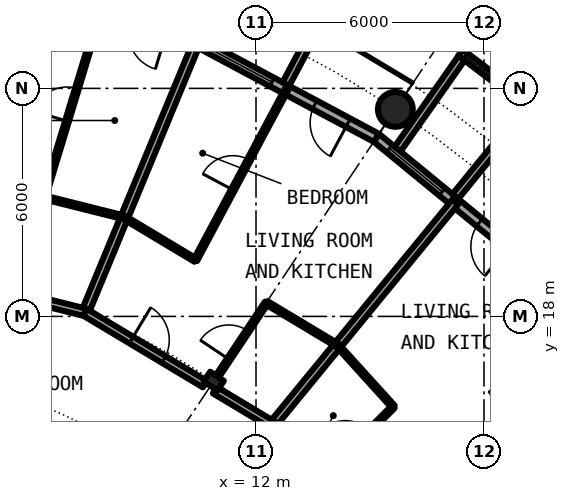
"""IFC4 building model, lengths in metres.
Left out: names, types, materials, properties, quantities, classifications, styles, units other than length and angle.
Written with IfcOpenShell. Run it as: python <this file> out.ifc"""

import sys

from ifc_helpers import new_model, si_unit, direction, frame, frame_2d, origin, origin_2d, place, context, subcontext, project, spatial, rectangle, circle, hollow_circle, i_section, extrude, element, fill, save


model = new_model("IFC4")
c1 = context("Model", 3, precision=1e-05, world=origin(), true_north=direction((0.0, 1.0)))
c2 = subcontext(c1, "Body", "Model", "MODEL_VIEW")
j1 = project(units=[si_unit("LENGTHUNIT", "METRE"), si_unit("PLANEANGLEUNIT", "RADIAN")], contexts=[c1])
p1 = place(None, origin())
s1 = spatial("IfcSite", under=j1, at=p1, CompositionType="ELEMENT")
p2 = place(p1, origin())
s2 = spatial("IfcBuilding", under=s1, at=p2, CompositionType="ELEMENT")
p3 = place(p2, frame((0.0, 0.0, 123.85)))
s3 = spatial("IfcBuildingStorey", under=s2, at=p3, CompositionType="ELEMENT", Elevation=123.85)
p4 = place(p3, frame((15.667, 23.448, 0.0), z_axis=(0.0, 0.0, 1.0), x_axis=(1.0, 0.0, 0.0)))
e1 = element("IfcColumn", 1, at=p4, inside=s3, PredefinedType="COLUMN", context=c2, shape_type="SweptSolid", body=[
    extrude(hollow_circle(Radius=0.457, WallThickness=0.04, at=origin_2d()), origin(), (0.0, 0.0, 1.0), 3.05),
])
p5 = place(p3, frame((10.889, 16.297, 0.0), z_axis=(0.0, 0.0, 1.0), x_axis=(0.55557023302, 0.831469612303, 0.0)))
e2 = element("IfcColumn", 2, at=p5, inside=s3, PredefinedType="COLUMN", context=c2, shape_type="SweptSolid", body=[
    extrude(i_section(OverallWidth=0.307, OverallDepth=0.432, WebThickness=0.021, FlangeThickness=0.04, FilletRadius=0.027, at=origin_2d()), origin(), (0.0, 0.0, 1.0), 3.05),
])
p6 = place(p3, frame((19.304, 19.304, 0.0), z_axis=(0.0, 0.0, 1.0), x_axis=(-0.773019449054, 0.634382322723, 0.0)))
e3 = element("IfcWall", 3, at=p6, inside=s3, PredefinedType="SOLIDWALL", context=c2, shape_type="SweptSolid", body=[
    extrude(rectangle(XDim=5.352, YDim=0.25, at=frame_2d((2.676, 0.0))), origin(), (0.0, 0.0, 1.0), 2.7),
])
p7 = place(p6, frame((0.841, 0.0, 0.0)))
e4 = element("IfcOpeningElement", 4, at=p7, cuts=e3, PredefinedType="OPENING", context=c2, shape_type="SweptSolid", body=[
    extrude(rectangle(XDim=1.0, YDim=2.2, at=frame_2d((0.5, 1.1))), frame((0.0, 0.135, 0.0), z_axis=(0.0, -1.0, 0.0), x_axis=(1.0, 0.0, 0.0)), (0.0, 0.0, 1.0), 0.27),
])
p8 = place(p6, frame((3.111, 0.0, 0.3)))
e5 = element("IfcOpeningElement", 5, at=p8, cuts=e3, PredefinedType="OPENING", context=c2, shape_type="SweptSolid", body=[
    extrude(rectangle(XDim=1.8, YDim=2.1, at=frame_2d((0.9, 1.05))), frame((0.0, 0.135, 0.0), z_axis=(0.0, -1.0, 0.0), x_axis=(1.0, 0.0, 0.0)), (0.0, 0.0, 1.0), 0.27),
])
p9 = place(p3, frame((19.289, 23.497, -0.03), z_axis=(0.0, 0.0, 1.0), x_axis=(-0.797456837111, 0.603375996329, 0.0)))
e6 = element("IfcWall", 6, at=p9, inside=s3, PredefinedType="SOLIDWALL", context=c2, shape_type="SweptSolid", body=[
    extrude(rectangle(XDim=2.391, YDim=0.2, at=frame_2d((1.196, 0.0))), origin(), (0.0, 0.0, 1.0), 2.73),
])
p10 = place(p9, frame((0.156, 0.0, 0.33)))
e7 = element("IfcOpeningElement", 7, at=p10, cuts=e6, PredefinedType="OPENING", context=c2, shape_type="SweptSolid", body=[
    extrude(circle(Radius=1.04, at=frame_2d((1.04, 1.04))), frame((0.0, 0.11, 0.0), z_axis=(0.0, -1.0, 0.0), x_axis=(1.0, 0.0, 0.0)), (0.0, 0.0, 1.0), 0.22),
])
p11 = place(p3, frame((17.246, 21.155, -0.03), z_axis=(0.0, 0.0, 1.0), x_axis=(0.631741648902, 0.775179004516, 0.0)))
e8 = element("IfcWall", 8, at=p11, inside=s3, PredefinedType="SOLIDWALL", context=c2, shape_type="SweptSolid", body=[
    extrude(rectangle(XDim=3.006, YDim=0.2, at=frame_2d((1.503, 0.0))), origin(), (0.0, 0.0, 1.0), 2.73),
])
p12 = place(p3, frame((15.726, 22.402, -0.03), z_axis=(0.0, 0.0, 1.0), x_axis=(0.574826383135, 0.818275399393, 0.0)))
e9 = element("IfcWall", 9, at=p12, inside=s3, PredefinedType="SOLIDWALL", context=c2, shape_type="SweptSolid", body=[
    extrude(rectangle(XDim=2.929, YDim=0.2, at=frame_2d((1.465, 0.0))), origin(), (0.0, 0.0, 1.0), 2.73),
])
p13 = place(p3, frame((15.167, 22.699, 0.0), z_axis=(0.0, 0.0, 1.0), x_axis=(-0.881915646801, 0.471407246368, 0.0)))
e10 = element("IfcWall", 10, at=p13, inside=s3, PredefinedType="SOLIDWALL", context=c2, shape_type="SweptSolid", body=[
    extrude(rectangle(XDim=5.352, YDim=0.25, at=frame_2d((2.676, 0.0))), origin(), (0.0, 0.0, 1.0), 2.7),
])
p14 = place(p13, frame((0.841, 0.0, 0.0)))
e11 = element("IfcOpeningElement", 11, at=p14, cuts=e10, PredefinedType="OPENING", context=c2, shape_type="SweptSolid", body=[
    extrude(rectangle(XDim=1.0, YDim=2.2, at=frame_2d((0.5, 1.1))), frame((0.0, 0.135, 0.0), z_axis=(0.0, -1.0, 0.0), x_axis=(1.0, 0.0, 0.0)), (0.0, 0.0, 1.0), 0.27),
])
p15 = place(p13, frame((3.111, 0.0, 0.3)))
e12 = element("IfcOpeningElement", 12, at=p15, cuts=e10, PredefinedType="OPENING", context=c2, shape_type="SweptSolid", body=[
    extrude(rectangle(XDim=1.8, YDim=2.1, at=frame_2d((0.9, 1.05))), frame((0.0, 0.135, 0.0), z_axis=(0.0, -1.0, 0.0), x_axis=(1.0, 0.0, 0.0)), (0.0, 0.0, 1.0), 0.27),
])
p16 = place(p3, frame((12.787, 24.113, -0.03), z_axis=(0.0, 0.0, 1.0), x_axis=(0.468365282436, 0.883534924159, 0.0)))
e13 = element("IfcWall", 13, at=p16, inside=s3, PredefinedType="SOLIDWALL", context=c2, shape_type="SweptSolid", body=[
    extrude(rectangle(XDim=3.006, YDim=0.2, at=frame_2d((1.503, 0.0))), origin(), (0.0, 0.0, 1.0), 2.73),
])
p17 = place(p3, frame((6.418, 21.133, 0.0), z_axis=(0.0, 0.0, 1.0), x_axis=(0.290651827018, 0.956828885147, 0.0)))
e14 = element("IfcWall", 14, at=p17, inside=s3, PredefinedType="PARTITIONING", context=c2, shape_type="SweptSolid", body=[
    extrude(rectangle(XDim=5.089, YDim=0.1, at=frame_2d((2.544, 0.0))), origin(), (0.0, 0.0, 1.0), 2.7),
])
p18 = place(p17, frame((2.094, 0.0, 0.0)))
e15 = element("IfcOpeningElement", 15, at=p18, cuts=e14, PredefinedType="OPENING", context=c2, shape_type="SweptSolid", body=[
    extrude(rectangle(XDim=0.9, YDim=2.3, at=frame_2d((0.45, 1.15))), frame((0.0, 0.06, 0.0), z_axis=(0.0, -1.0, 0.0), x_axis=(1.0, 0.0, 0.0)), (0.0, 0.0, 1.0), 0.12),
])
p19 = place(p3, frame((7.501, 18.108, 0.0), z_axis=(0.0, 0.0, 1.0), x_axis=(0.382490346157, 0.923959487801, 0.0)))
e16 = element("IfcWall", 16, at=p19, inside=s3, PredefinedType="PARTITIONING", context=c2, shape_type="SweptSolid", body=[
    extrude(rectangle(XDim=7.574, YDim=0.2, at=frame_2d((3.787, 0.0))), origin(), (0.0, 0.0, 1.0), 2.7),
])
p20 = place(p3, frame((10.405, 19.481, 0.0), z_axis=(0.0, 0.0, 1.0), x_axis=(0.471170755767, 0.882042016522, 0.0)))
e17 = element("IfcWall", 17, at=p20, inside=s3, PredefinedType="PARTITIONING", context=c2, shape_type="SweptSolid", body=[
    extrude(rectangle(XDim=5.089, YDim=0.1, at=frame_2d((2.545, 0.0))), origin(), (0.0, 0.0, 1.0), 2.7),
])
p21 = place(p20, frame((2.095, 0.0, 0.0)))
e18 = element("IfcOpeningElement", 18, at=p21, cuts=e17, PredefinedType="OPENING", context=c2, shape_type="SweptSolid", body=[
    extrude(rectangle(XDim=0.9, YDim=2.3, at=frame_2d((0.45, 1.15))), frame((0.0, 0.06, 0.0), z_axis=(0.0, -1.0, 0.0), x_axis=(1.0, 0.0, 0.0)), (0.0, 0.0, 1.0), 0.12),
])
p22 = place(p3, frame((11.015, 16.473, 0.0), z_axis=(0.0, 0.0, 1.0), x_axis=(0.555568680968, 0.831470649348, 0.0)))
e19 = element("IfcWall", 19, at=p22, inside=s3, PredefinedType="PARTITIONING", context=c2, shape_type="SweptSolid", body=[
    extrude(rectangle(XDim=2.27, YDim=0.1, at=frame_2d((1.135, 0.0))), origin(), (0.0, 0.0, 1.0), 2.7),
])
p23 = place(p22, frame((0.483, 0.0, 0.0)))
e20 = element("IfcOpeningElement", 20, at=p23, cuts=e19, PredefinedType="OPENING", context=c2, shape_type="SweptSolid", body=[
    extrude(rectangle(XDim=0.9, YDim=2.3, at=frame_2d((0.45, 1.15))), frame((0.0, 0.06, 0.0), z_axis=(0.0, -1.0, 0.0), x_axis=(1.0, 0.0, 0.0)), (0.0, 0.0, 1.0), 0.12),
])
p24 = place(p3, frame((12.434, 15.151, 0.0), z_axis=(0.0, 0.0, 1.0), x_axis=(0.634381303318, 0.773020285633, 0.0)))
e21 = element("IfcWall", 21, at=p24, inside=s3, PredefinedType="PARTITIONING", context=c2, shape_type="SweptSolid", body=[
    extrude(rectangle(XDim=7.576, YDim=0.2, at=frame_2d((3.788, 0.0))), origin(), (0.0, 0.0, 1.0), 2.7),
])
p25 = place(p3, frame((13.722, 13.73, 0.0), z_axis=(0.0, 0.0, 1.0), x_axis=(0.706741540154, 0.707471833659, 0.0)))
e22 = element("IfcWall", 22, at=p25, inside=s3, PredefinedType="PARTITIONING", context=c2, shape_type="SweptSolid", body=[
    extrude(rectangle(XDim=2.674, YDim=0.1, at=frame_2d((1.337, 0.0))), origin(), (0.0, 0.0, 1.0), 2.7),
])
p26 = place(p25, frame((0.887, 0.0, 0.0)))
e23 = element("IfcOpeningElement", 23, at=p26, cuts=e22, PredefinedType="OPENING", context=c2, shape_type="SweptSolid", body=[
    extrude(rectangle(XDim=0.9, YDim=2.3, at=frame_2d((0.45, 1.15))), frame((0.0, 0.06, 0.0), z_axis=(0.0, -1.0, 0.0), x_axis=(1.0, 0.0, 0.0)), (0.0, 0.0, 1.0), 0.12),
])
p27 = place(p3, frame((17.077, 14.006, 0.0), z_axis=(0.0, 0.0, 1.0), x_axis=(0.77326214499, 0.634086472908, 0.0)))
e24 = element("IfcWall", 24, at=p27, inside=s3, PredefinedType="PARTITIONING", context=c2, shape_type="SweptSolid", body=[
    extrude(rectangle(XDim=5.089, YDim=0.1, at=frame_2d((2.544, 0.0))), origin(), (0.0, 0.0, 1.0), 2.7),
])
p28 = place(p27, frame((2.094, 0.0, 0.0)))
e25 = element("IfcOpeningElement", 25, at=p28, cuts=e24, PredefinedType="OPENING", context=c2, shape_type="SweptSolid", body=[
    extrude(rectangle(XDim=0.9, YDim=2.3, at=frame_2d((0.45, 1.15))), frame((0.0, 0.06, 0.0), z_axis=(0.0, -1.0, 0.0), x_axis=(1.0, 0.0, 0.0)), (0.0, 0.0, 1.0), 0.12),
])
p29 = place(p3, frame((3.3, 16.574, 0.0), z_axis=(0.0, 0.0, 1.0), x_axis=(0.831455567902, -0.555591251376, 0.0)))
e26 = element("IfcWall", 26, at=p29, inside=s3, PredefinedType="PARTITIONING", context=c2, shape_type="SweptSolid", body=[
    extrude(rectangle(XDim=11.314, YDim=0.2, at=frame_2d((5.657, 0.0))), origin(), (0.0, 0.0, 1.0), 2.7),
])
p30 = place(p29, frame((4.346, 0.0, 0.0)))
e27 = element("IfcOpeningElement", 27, at=p30, cuts=e26, PredefinedType="OPENING", context=c2, shape_type="SweptSolid", body=[
    extrude(rectangle(XDim=1.0, YDim=2.3, at=frame_2d((0.5, 1.15))), frame((0.0, 0.11, 0.0), z_axis=(0.0, -1.0, 0.0), x_axis=(1.0, 0.0, 0.0)), (0.0, 0.0, 1.0), 0.22),
])
p31 = place(p3, frame((3.936, 19.001, 0.0), z_axis=(0.0, 0.0, 1.0), x_axis=(0.970025155677, -0.243004521262, 0.0)))
e28 = element("IfcWall", 28, at=p31, inside=s3, PredefinedType="PARTITIONING", context=c2, shape_type="SweptSolid", body=[
    extrude(rectangle(XDim=3.675, YDim=0.2, at=frame_2d((1.837, 0.0))), origin(), (0.0, 0.0, 1.0), 2.39),
])
p32 = place(p31, frame((1.258, 0.0, 0.0)))
e29 = element("IfcOpeningElement", 29, at=p32, cuts=e28, PredefinedType="OPENING", context=c2, shape_type="SweptSolid", body=[
    extrude(rectangle(XDim=1.0, YDim=2.3, at=frame_2d((0.5, 1.15))), frame((0.0, 0.11, 0.0), z_axis=(0.0, -1.0, 0.0), x_axis=(1.0, 0.0, 0.0)), (0.0, 0.0, 1.0), 0.22),
])
p33 = place(p3, frame((7.501, 18.108, 0.0), z_axis=(0.0, 0.0, 1.0), x_axis=(0.857774179698, -0.514026708103, 0.0)))
e30 = element("IfcWall", 30, at=p33, inside=s3, PredefinedType="PARTITIONING", context=c2, shape_type="SweptSolid", body=[
    extrude(rectangle(XDim=3.675, YDim=0.2, at=frame_2d((1.837, 0.0))), origin(), (0.0, 0.0, 1.0), 2.39),
])
p34 = place(p33, frame((1.418, 0.0, 0.0)))
e31 = element("IfcOpeningElement", 31, at=p34, cuts=e30, PredefinedType="OPENING", context=c2, shape_type="SweptSolid", body=[
    extrude(rectangle(XDim=1.0, YDim=2.3, at=frame_2d((0.5, 1.15))), frame((0.0, 0.11, 0.0), z_axis=(0.0, -1.0, 0.0), x_axis=(1.0, 0.0, 0.0)), (0.0, 0.0, 1.0), 0.22),
])
p35 = place(p3, frame((10.916, 16.061, 0.0), z_axis=(0.0, 0.0, 1.0), x_axis=(0.857663265693, -0.514211748875, 0.0)))
e32 = element("IfcWall", 32, at=p35, inside=s3, PredefinedType="PARTITIONING", context=c2, shape_type="SweptSolid", body=[
    extrude(rectangle(XDim=1.77, YDim=0.2, at=frame_2d((0.885, 0.0))), origin(), (0.0, 0.0, 1.0), 2.39),
])
p36 = place(p3, frame((6.418, 21.133, 0.0), z_axis=(0.0, 0.0, 1.0), x_axis=(0.97003047456, -0.242983288366, 0.0)))
e33 = element("IfcWall", 33, at=p36, inside=s3, PredefinedType="PARTITIONING", context=c2, shape_type="SweptSolid", body=[
    extrude(rectangle(XDim=2.181, YDim=0.1, at=frame_2d((1.091, 0.0))), origin(), (0.0, 0.0, 1.0), 2.7),
])
for number, where, z_axis, x_axis in (
    (34, (8.534, 20.603, 0.0), (0.0, 0.0, 1.0), (0.858, -0.514, 0.0)),
    (35, (12.276, 18.359, 0.0), (0.0, 0.0, 1.0), (0.858, -0.514, 0.0)),
):
    element("IfcWall", number, at=place(p3, frame(where, z_axis=z_axis, x_axis=x_axis)), inside=s3, PredefinedType="PARTITIONING", context=c2, shape_type="SweptSolid", body=[
        extrude(rectangle(XDim=2.182, YDim=0.1, at=frame_2d((1.091, 0.0))), origin(), (0.0, 0.0, 1.0), 2.7),
    ])
p37 = place(p3, frame((14.147, 17.238, 0.0), z_axis=(0.0, 0.0, 1.0), x_axis=(0.671674967707, -0.740845960882, 0.0)))
e36 = element("IfcWall", 36, at=p37, inside=s3, PredefinedType="PARTITIONING", context=c2, shape_type="SweptSolid", body=[
    extrude(rectangle(XDim=2.181, YDim=0.1, at=frame_2d((1.091, 0.0))), origin(), (0.0, 0.0, 1.0), 2.7),
])
p38 = place(p7, origin())
e37 = element("IfcDoor", 37, at=p38, inside=s3, OperationType="SINGLE_SWING_LEFT", PredefinedType="DOOR", context=c2, shape_type="SweptSolid", body=[
    extrude(rectangle(XDim=1.0, YDim=2.2, at=frame_2d((0.5, 1.1))), frame((0.0, 0.025, 0.0), z_axis=(0.0, -1.0, 0.0), x_axis=(1.0, 0.0, 0.0)), (0.0, 0.0, 1.0), 0.05),
])
fill(e4, e37)
p39 = place(p8, origin())
e38 = element("IfcWindow", 38, at=p39, inside=s3, PartitioningType="SINGLE_PANEL", PredefinedType="WINDOW", context=c2, shape_type="SweptSolid", body=[
    extrude(rectangle(XDim=1.8, YDim=2.1, at=frame_2d((0.9, 1.05))), frame((0.0, 0.03, 0.0), z_axis=(0.0, -1.0, 0.0), x_axis=(1.0, 0.0, 0.0)), (0.0, 0.0, 1.0), 0.06),
])
fill(e5, e38)
p40 = place(p10, origin())
e39 = element("IfcWindow", 39, at=p40, inside=s3, PartitioningType="SINGLE_PANEL", PredefinedType="WINDOW", context=c2, shape_type="SweptSolid", body=[
    extrude(circle(Radius=1.04, at=frame_2d((1.04, 1.04))), frame((0.0, 0.03, 0.0), z_axis=(0.0, -1.0, 0.0), x_axis=(1.0, 0.0, 0.0)), (0.0, 0.0, 1.0), 0.06),
])
fill(e7, e39)
p41 = place(p14, origin())
e40 = element("IfcDoor", 40, at=p41, inside=s3, OperationType="SINGLE_SWING_LEFT", PredefinedType="DOOR", context=c2, shape_type="SweptSolid", body=[
    extrude(rectangle(XDim=1.0, YDim=2.2, at=frame_2d((0.5, 1.1))), frame((0.0, 0.025, 0.0), z_axis=(0.0, -1.0, 0.0), x_axis=(1.0, 0.0, 0.0)), (0.0, 0.0, 1.0), 0.05),
])
fill(e11, e40)
p42 = place(p15, origin())
e41 = element("IfcWindow", 41, at=p42, inside=s3, PartitioningType="SINGLE_PANEL", PredefinedType="WINDOW", context=c2, shape_type="SweptSolid", body=[
    extrude(rectangle(XDim=1.8, YDim=2.1, at=frame_2d((0.9, 1.05))), frame((0.0, 0.03, 0.0), z_axis=(0.0, -1.0, 0.0), x_axis=(1.0, 0.0, 0.0)), (0.0, 0.0, 1.0), 0.06),
])
fill(e12, e41)
p43 = place(p34, origin())
e42 = element("IfcDoor", 42, at=p43, inside=s3, OperationType="SINGLE_SWING_RIGHT", PredefinedType="DOOR", context=c2, shape_type="SweptSolid", body=[
    extrude(rectangle(XDim=1.0, YDim=2.3, at=frame_2d((0.5, 1.15))), frame((0.0, 0.025, 0.0), z_axis=(0.0, -1.0, 0.0), x_axis=(1.0, 0.0, 0.0)), (0.0, 0.0, 1.0), 0.05),
])
fill(e31, e42)
p44 = place(p23, origin())
e43 = element("IfcDoor", 43, at=p44, inside=s3, OperationType="SINGLE_SWING_LEFT", PredefinedType="DOOR", context=c2, shape_type="SweptSolid", body=[
    extrude(rectangle(XDim=0.9, YDim=2.3, at=frame_2d((0.45, 1.15))), frame((0.0, 0.025, 0.0), z_axis=(0.0, -1.0, 0.0), x_axis=(1.0, 0.0, 0.0)), (0.0, 0.0, 1.0), 0.05),
])
fill(e20, e43)
p45 = place(p21, origin())
e44 = element("IfcDoor", 44, at=p45, inside=s3, OperationType="SINGLE_SWING_RIGHT", PredefinedType="DOOR", context=c2, shape_type="SweptSolid", body=[
    extrude(rectangle(XDim=0.9, YDim=2.3, at=frame_2d((0.45, 1.15))), frame((0.0, 0.025, 0.0), z_axis=(0.0, -1.0, 0.0), x_axis=(1.0, 0.0, 0.0)), (0.0, 0.0, 1.0), 0.05),
])
fill(e18, e44)
p46 = place(p18, origin())
e45 = element("IfcDoor", 45, at=p46, inside=s3, OperationType="SINGLE_SWING_LEFT", PredefinedType="DOOR", context=c2, shape_type="SweptSolid", body=[
    extrude(rectangle(XDim=0.9, YDim=2.3, at=frame_2d((0.45, 1.15))), frame((0.0, 0.025, 0.0), z_axis=(0.0, -1.0, 0.0), x_axis=(1.0, 0.0, 0.0)), (0.0, 0.0, 1.0), 0.05),
])
fill(e15, e45)
save(model, sys.argv[1])
